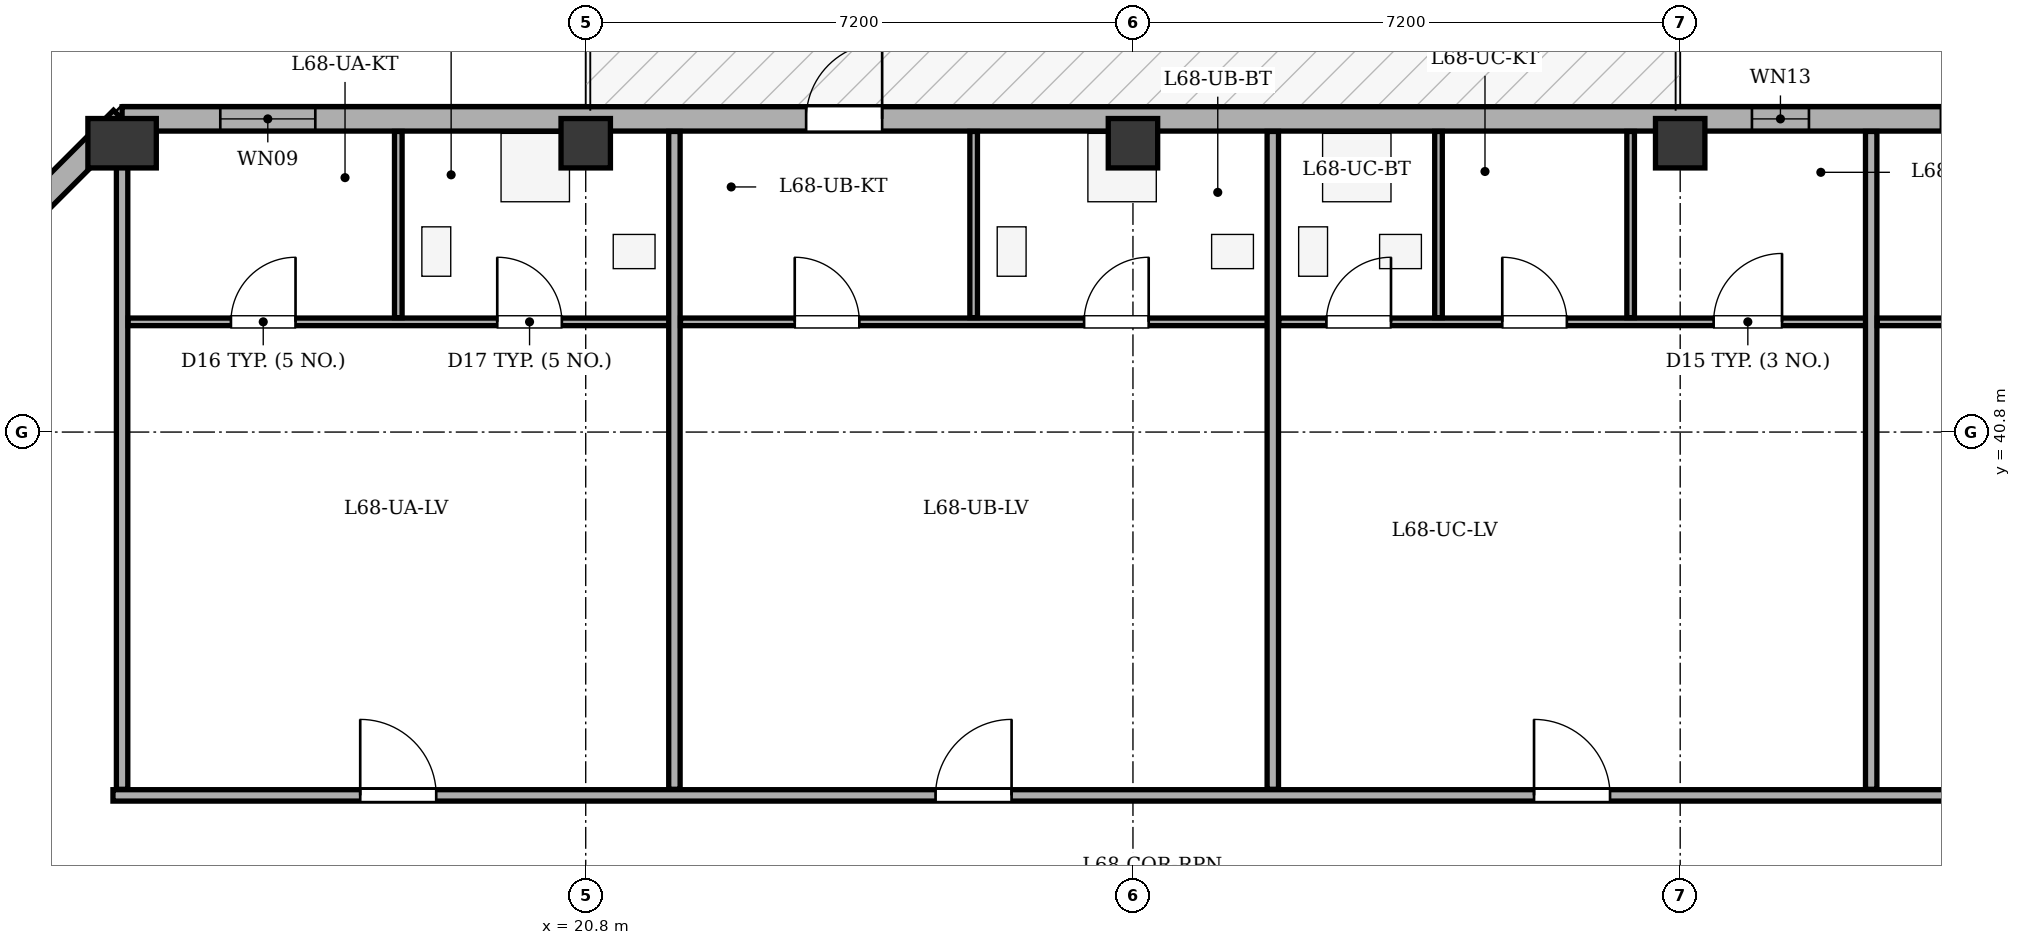
"""IFC4 building model, lengths in metres.
Left out: names, types, materials, properties, quantities, classifications, styles, units other than length and angle.
Written with IfcOpenShell. Run it as: python <this file> out.ifc"""

import sys

from ifc_helpers import new_model, si_unit, direction, frame, frame_2d, origin, origin_2d, place, context, subcontext, project, spatial, rectangle, extrude, element, fill, save


model = new_model("IFC4")
c1 = context("Model", 3, precision=1e-05, world=origin(), true_north=direction((0.0, 1.0)))
c2 = subcontext(c1, "Body", "Model", "MODEL_VIEW")
j1 = project(units=[si_unit("LENGTHUNIT", "METRE"), si_unit("PLANEANGLEUNIT", "RADIAN")], contexts=[c1])
p1 = place(None, origin())
s1 = spatial("IfcSite", under=j1, at=p1, CompositionType="ELEMENT")
p2 = place(p1, origin())
s2 = spatial("IfcBuilding", under=s1, at=p2, CompositionType="ELEMENT")
p3 = place(p2, frame((0.0, 0.0, 258.5)))
s3 = spatial("IfcBuildingStorey", under=s2, at=p3, CompositionType="ELEMENT", Elevation=258.5)
p4 = place(p3, frame((14.7, 44.6, 0.0), z_axis=(0.0, 0.0, 1.0), x_axis=(1.0, 0.0, 0.0)))
e1 = element("IfcColumn", 1, at=p4, inside=s3, PredefinedType="COLUMN", context=c2, shape_type="SweptSolid", body=[
    extrude(rectangle(XDim=0.65, YDim=0.9, at=origin_2d()), origin(), (0.0, 0.0, 1.0), 3.4),
])
for number, where, z_axis, x_axis in (
    (2, (20.8, 44.6, 0.0), (0.0, 0.0, 1.0), (1.0, 0.0, 0.0)),
    (3, (28.0, 44.6, 0.0), (0.0, 0.0, 1.0), (1.0, 0.0, 0.0)),
    (4, (35.2, 44.6, 0.0), (0.0, 0.0, 1.0), (1.0, 0.0, 0.0)),
):
    element("IfcColumn", number, at=place(p3, frame(where, z_axis=z_axis, x_axis=x_axis)), inside=s3, PredefinedType="COLUMN", context=c2, shape_type="SweptSolid", body=[
        extrude(rectangle(XDim=0.65, YDim=0.65, at=origin_2d()), origin(), (0.0, 0.0, 1.0), 3.4),
    ])
p5 = place(p3, frame((10.88, 41.1, 0.0), z_axis=(0.0, 0.0, 1.0), x_axis=(0.70712937715, 0.707084184501, 0.0)))
e5 = element("IfcWall", 5, at=p5, inside=s3, PredefinedType="STANDARD", context=c2, shape_type="SweptSolid", body=[
    extrude(rectangle(XDim=5.402, YDim=0.32, at=frame_2d((2.701, 0.0))), origin(), (0.0, 0.0, 1.0), 2.725),
])
p6 = place(p5, frame((2.001, 0.0, 0.75)))
e6 = element("IfcOpeningElement", 6, at=p6, cuts=e5, PredefinedType="OPENING", context=c2, shape_type="SweptSolid", body=[
    extrude(rectangle(XDim=1.4, YDim=1.65, at=frame_2d((0.7, 0.825))), frame((0.0, 0.17, 0.0), z_axis=(0.0, -1.0, 0.0), x_axis=(1.0, 0.0, 0.0)), (0.0, 0.0, 1.0), 0.34),
])
p7 = place(p3, frame((14.7, 44.92, 0.0), z_axis=(0.0, 0.0, 1.0), x_axis=(1.0, 0.0, 0.0)))
e7 = element("IfcWall", 7, at=p7, inside=s3, PredefinedType="STANDARD", context=c2, shape_type="SweptSolid", body=[
    extrude(rectangle(XDim=37.0, YDim=0.32, at=frame_2d((18.5, 0.0))), origin(), (0.0, 0.0, 1.0), 2.725),
])
p8 = place(p7, frame((9.0, 0.0, 0.0)))
e8 = element("IfcOpeningElement", 8, at=p8, cuts=e7, PredefinedType="OPENING", context=c2, shape_type="SweptSolid", body=[
    extrude(rectangle(XDim=1.0, YDim=2.02, at=frame_2d((0.5, 1.01))), frame((0.0, 0.17, 0.0), z_axis=(0.0, -1.0, 0.0), x_axis=(1.0, 0.0, 0.0)), (0.0, 0.0, 1.0), 0.34),
])
p9 = place(p7, frame((1.292, 0.0, 0.75)))
e9 = element("IfcOpeningElement", 9, at=p9, cuts=e7, PredefinedType="OPENING", context=c2, shape_type="SweptSolid", body=[
    extrude(rectangle(XDim=1.25, YDim=1.7, at=frame_2d((0.625, 0.85))), frame((0.0, 0.17, 0.0), z_axis=(0.0, -1.0, 0.0), x_axis=(1.0, 0.0, 0.0)), (0.0, 0.0, 1.0), 0.34),
])
p10 = place(p7, frame((23.93, 0.0, 0.75)))
e10 = element("IfcOpeningElement", 10, at=p10, cuts=e7, PredefinedType="OPENING", context=c2, shape_type="SweptSolid", body=[
    extrude(rectangle(XDim=1.8, YDim=1.7, at=frame_2d((0.9, 0.85))), frame((0.0, 0.17, 0.0), z_axis=(0.0, -1.0, 0.0), x_axis=(1.0, 0.0, 0.0)), (0.0, 0.0, 1.0), 0.34),
])
p11 = place(p7, frame((27.563, 0.0, 0.75)))
e11 = element("IfcOpeningElement", 11, at=p11, cuts=e7, PredefinedType="OPENING", context=c2, shape_type="SweptSolid", body=[
    extrude(rectangle(XDim=1.8, YDim=1.7, at=frame_2d((0.9, 0.85))), frame((0.0, 0.17, 0.0), z_axis=(0.0, -1.0, 0.0), x_axis=(1.0, 0.0, 0.0)), (0.0, 0.0, 1.0), 0.34),
])
p12 = place(p7, frame((31.315, 0.0, 0.75)))
e12 = element("IfcOpeningElement", 12, at=p12, cuts=e7, PredefinedType="OPENING", context=c2, shape_type="SweptSolid", body=[
    extrude(rectangle(XDim=1.8, YDim=1.7, at=frame_2d((0.9, 0.85))), frame((0.0, 0.17, 0.0), z_axis=(0.0, -1.0, 0.0), x_axis=(1.0, 0.0, 0.0)), (0.0, 0.0, 1.0), 0.34),
])
p13 = place(p7, frame((33.965, 0.0, 0.75)))
e13 = element("IfcOpeningElement", 13, at=p13, cuts=e7, PredefinedType="OPENING", context=c2, shape_type="SweptSolid", body=[
    extrude(rectangle(XDim=1.8, YDim=1.7, at=frame_2d((0.9, 0.85))), frame((0.0, 0.17, 0.0), z_axis=(0.0, -1.0, 0.0), x_axis=(1.0, 0.0, 0.0)), (0.0, 0.0, 1.0), 0.34),
])
p14 = place(p7, frame((21.444, 0.0, 0.75)))
e14 = element("IfcOpeningElement", 14, at=p14, cuts=e7, PredefinedType="OPENING", context=c2, shape_type="SweptSolid", body=[
    extrude(rectangle(XDim=0.75, YDim=1.45, at=frame_2d((0.375, 0.725))), frame((0.0, 0.17, 0.0), z_axis=(0.0, -1.0, 0.0), x_axis=(1.0, 0.0, 0.0)), (0.0, 0.0, 1.0), 0.34),
])
p15 = place(p3, frame((14.58, 36.02, 0.0), z_axis=(0.0, 0.0, 1.0), x_axis=(1.0, 0.0, 0.0)))
e15 = element("IfcWall", 15, at=p15, inside=s3, PredefinedType="PARTITIONING", context=c2, shape_type="SweptSolid", body=[
    extrude(rectangle(XDim=30.52, YDim=0.15, at=frame_2d((15.26, 0.0))), origin(), (0.0, 0.0, 1.0), 3.1),
])
p16 = place(p15, frame((3.253, 0.0, 0.0)))
e16 = element("IfcOpeningElement", 16, at=p16, cuts=e15, PredefinedType="OPENING", context=c2, shape_type="SweptSolid", body=[
    extrude(rectangle(XDim=1.0, YDim=2.1, at=frame_2d((0.5, 1.05))), frame((0.0, 0.085, 0.0), z_axis=(0.0, -1.0, 0.0), x_axis=(1.0, 0.0, 0.0)), (0.0, 0.0, 1.0), 0.17),
])
p17 = place(p15, frame((10.823, 0.0, 0.0)))
e17 = element("IfcOpeningElement", 17, at=p17, cuts=e15, PredefinedType="OPENING", context=c2, shape_type="SweptSolid", body=[
    extrude(rectangle(XDim=1.0, YDim=2.1, at=frame_2d((0.5, 1.05))), frame((0.0, 0.085, 0.0), z_axis=(0.0, -1.0, 0.0), x_axis=(1.0, 0.0, 0.0)), (0.0, 0.0, 1.0), 0.17),
])
p18 = place(p15, frame((18.697, 0.0, 0.0)))
e18 = element("IfcOpeningElement", 18, at=p18, cuts=e15, PredefinedType="OPENING", context=c2, shape_type="SweptSolid", body=[
    extrude(rectangle(XDim=1.0, YDim=2.1, at=frame_2d((0.5, 1.05))), frame((0.0, 0.085, 0.0), z_axis=(0.0, -1.0, 0.0), x_axis=(1.0, 0.0, 0.0)), (0.0, 0.0, 1.0), 0.17),
])
p19 = place(p15, frame((26.267, 0.0, 0.0)))
e19 = element("IfcOpeningElement", 19, at=p19, cuts=e15, PredefinedType="OPENING", context=c2, shape_type="SweptSolid", body=[
    extrude(rectangle(XDim=1.0, YDim=2.1, at=frame_2d((0.5, 1.05))), frame((0.0, 0.085, 0.0), z_axis=(0.0, -1.0, 0.0), x_axis=(1.0, 0.0, 0.0)), (0.0, 0.0, 1.0), 0.17),
])
p20 = place(p3, frame((14.7, 36.1, 0.0), z_axis=(0.0, 0.0, 1.0), x_axis=(0.0, 1.0, 0.0)))
e20 = element("IfcWall", 20, at=p20, inside=s3, PredefinedType="PARTITIONING", context=c2, shape_type="SweptSolid", body=[
    extrude(rectangle(XDim=8.655, YDim=0.15, at=frame_2d((4.327, 0.0))), origin(), (0.0, 0.0, 1.0), 3.1),
])
p21 = place(p3, frame((14.78, 42.25, 0.0), z_axis=(0.0, 0.0, 1.0), x_axis=(1.0, 0.0, 0.0)))
e21 = element("IfcWall", 21, at=p21, inside=s3, PredefinedType="PARTITIONING", context=c2, shape_type="SweptSolid", body=[
    extrude(rectangle(XDim=7.227, YDim=0.1, at=frame_2d((3.614, 0.0))), origin(), (0.0, 0.0, 1.0), 3.1),
])
p22 = place(p21, frame((1.352, 0.0, 0.0)))
e22 = element("IfcOpeningElement", 22, at=p22, cuts=e21, PredefinedType="OPENING", context=c2, shape_type="SweptSolid", body=[
    extrude(rectangle(XDim=0.85, YDim=2.05, at=frame_2d((0.425, 1.025))), frame((0.0, 0.06, 0.0), z_axis=(0.0, -1.0, 0.0), x_axis=(1.0, 0.0, 0.0)), (0.0, 0.0, 1.0), 0.12),
])
p23 = place(p21, frame((4.856, 0.0, 0.0)))
e23 = element("IfcOpeningElement", 23, at=p23, cuts=e21, PredefinedType="OPENING", context=c2, shape_type="SweptSolid", body=[
    extrude(rectangle(XDim=0.85, YDim=2.05, at=frame_2d((0.425, 1.025))), frame((0.0, 0.06, 0.0), z_axis=(0.0, -1.0, 0.0), x_axis=(1.0, 0.0, 0.0)), (0.0, 0.0, 1.0), 0.12),
])
p24 = place(p3, frame((18.334, 42.305, 0.0), z_axis=(0.0, 0.0, 1.0), x_axis=(0.0, 1.0, 0.0)))
e24 = element("IfcWall", 24, at=p24, inside=s3, PredefinedType="PARTITIONING", context=c2, shape_type="SweptSolid", body=[
    extrude(rectangle(XDim=2.45, YDim=0.1, at=frame_2d((1.225, 0.0))), origin(), (0.0, 0.0, 1.0), 3.1),
])
p25 = place(p3, frame((21.967, 36.1, 0.0), z_axis=(0.0, 0.0, 1.0), x_axis=(0.0, 1.0, 0.0)))
e25 = element("IfcWall", 25, at=p25, inside=s3, PredefinedType="PARTITIONING", context=c2, shape_type="SweptSolid", body=[
    extrude(rectangle(XDim=8.655, YDim=0.15, at=frame_2d((4.327, 0.0))), origin(), (0.0, 0.0, 1.0), 3.1),
])
p26 = place(p3, frame((22.047, 42.25, 0.0), z_axis=(0.0, 0.0, 1.0), x_axis=(1.0, 0.0, 0.0)))
e26 = element("IfcWall", 26, at=p26, inside=s3, PredefinedType="PARTITIONING", context=c2, shape_type="SweptSolid", body=[
    extrude(rectangle(XDim=7.833, YDim=0.1, at=frame_2d((3.917, 0.0))), origin(), (0.0, 0.0, 1.0), 3.1),
])
p27 = place(p26, frame((1.503, 0.0, 0.0)))
e27 = element("IfcOpeningElement", 27, at=p27, cuts=e26, PredefinedType="OPENING", context=c2, shape_type="SweptSolid", body=[
    extrude(rectangle(XDim=0.85, YDim=2.05, at=frame_2d((0.425, 1.025))), frame((0.0, 0.06, 0.0), z_axis=(0.0, -1.0, 0.0), x_axis=(1.0, 0.0, 0.0)), (0.0, 0.0, 1.0), 0.12),
])
p28 = place(p26, frame((5.31, 0.0, 0.0)))
e28 = element("IfcOpeningElement", 28, at=p28, cuts=e26, PredefinedType="OPENING", context=c2, shape_type="SweptSolid", body=[
    extrude(rectangle(XDim=0.85, YDim=2.05, at=frame_2d((0.425, 1.025))), frame((0.0, 0.06, 0.0), z_axis=(0.0, -1.0, 0.0), x_axis=(1.0, 0.0, 0.0)), (0.0, 0.0, 1.0), 0.12),
])
p29 = place(p3, frame((25.904, 42.305, 0.0), z_axis=(0.0, 0.0, 1.0), x_axis=(0.0, 1.0, 0.0)))
e29 = element("IfcWall", 29, at=p29, inside=s3, PredefinedType="PARTITIONING", context=c2, shape_type="SweptSolid", body=[
    extrude(rectangle(XDim=2.45, YDim=0.1, at=frame_2d((1.225, 0.0))), origin(), (0.0, 0.0, 1.0), 3.1),
])
p30 = place(p3, frame((29.84, 36.1, 0.0), z_axis=(0.0, 0.0, 1.0), x_axis=(0.0, 1.0, 0.0)))
e30 = element("IfcWall", 30, at=p30, inside=s3, PredefinedType="PARTITIONING", context=c2, shape_type="SweptSolid", body=[
    extrude(rectangle(XDim=8.655, YDim=0.15, at=frame_2d((4.327, 0.0))), origin(), (0.0, 0.0, 1.0), 2.725),
])
p31 = place(p3, frame((29.92, 42.25, 0.0), z_axis=(0.0, 0.0, 1.0), x_axis=(1.0, 0.0, 0.0)))
e31 = element("IfcWall", 31, at=p31, inside=s3, PredefinedType="PARTITIONING", context=c2, shape_type="SweptSolid", body=[
    extrude(rectangle(XDim=7.833, YDim=0.1, at=frame_2d((3.917, 0.0))), origin(), (0.0, 0.0, 1.0), 3.1),
])
p32 = place(p31, frame((0.625, 0.0, 0.0)))
e32 = element("IfcOpeningElement", 32, at=p32, cuts=e31, PredefinedType="OPENING", context=c2, shape_type="SweptSolid", body=[
    extrude(rectangle(XDim=0.85, YDim=2.05, at=frame_2d((0.425, 1.025))), frame((0.0, 0.06, 0.0), z_axis=(0.0, -1.0, 0.0), x_axis=(1.0, 0.0, 0.0)), (0.0, 0.0, 1.0), 0.12),
])
p33 = place(p31, frame((2.939, 0.0, 0.0)))
e33 = element("IfcOpeningElement", 33, at=p33, cuts=e31, PredefinedType="OPENING", context=c2, shape_type="SweptSolid", body=[
    extrude(rectangle(XDim=0.85, YDim=2.05, at=frame_2d((0.425, 1.025))), frame((0.0, 0.06, 0.0), z_axis=(0.0, -1.0, 0.0), x_axis=(1.0, 0.0, 0.0)), (0.0, 0.0, 1.0), 0.12),
])
p34 = place(p31, frame((5.72, 0.0, 0.0)))
e34 = element("IfcOpeningElement", 34, at=p34, cuts=e31, PredefinedType="OPENING", context=c2, shape_type="SweptSolid", body=[
    extrude(rectangle(XDim=0.9, YDim=2.05, at=frame_2d((0.45, 1.025))), frame((0.0, 0.06, 0.0), z_axis=(0.0, -1.0, 0.0), x_axis=(1.0, 0.0, 0.0)), (0.0, 0.0, 1.0), 0.12),
])
for number, where, z_axis, x_axis in (
    (35, (32.02, 42.305, 0.0), (0.0, 0.0, 1.0), (0.0, 1.0, 0.0)),
    (36, (34.548, 42.305, 0.0), (0.0, 0.0, 1.0), (0.0, 1.0, 0.0)),
):
    element("IfcWall", number, at=place(p3, frame(where, z_axis=z_axis, x_axis=x_axis)), inside=s3, PredefinedType="PARTITIONING", context=c2, shape_type="SweptSolid", body=[
        extrude(rectangle(XDim=2.45, YDim=0.1, at=frame_2d((1.225, 0.0))), origin(), (0.0, 0.0, 1.0), 3.1),
    ])
p35 = place(p3, frame((37.713, 36.1, 0.0), z_axis=(0.0, 0.0, 1.0), x_axis=(0.0, 1.0, 0.0)))
e37 = element("IfcWall", 37, at=p35, inside=s3, PredefinedType="PARTITIONING", context=c2, shape_type="SweptSolid", body=[
    extrude(rectangle(XDim=8.655, YDim=0.15, at=frame_2d((4.327, 0.0))), origin(), (0.0, 0.0, 1.0), 3.1),
])
p36 = place(p3, frame((37.793, 42.25, 0.0), z_axis=(0.0, 0.0, 1.0), x_axis=(1.0, 0.0, 0.0)))
e38 = element("IfcWall", 38, at=p36, inside=s3, PredefinedType="PARTITIONING", context=c2, shape_type="SweptSolid", body=[
    extrude(rectangle(XDim=7.227, YDim=0.1, at=frame_2d((3.614, 0.0))), origin(), (0.0, 0.0, 1.0), 3.1),
])
p37 = place(p36, frame((1.352, 0.0, 0.0)))
e39 = element("IfcOpeningElement", 39, at=p37, cuts=e38, PredefinedType="OPENING", context=c2, shape_type="SweptSolid", body=[
    extrude(rectangle(XDim=0.85, YDim=2.05, at=frame_2d((0.425, 1.025))), frame((0.0, 0.06, 0.0), z_axis=(0.0, -1.0, 0.0), x_axis=(1.0, 0.0, 0.0)), (0.0, 0.0, 1.0), 0.12),
])
p38 = place(p36, frame((4.855, 0.0, 0.0)))
e40 = element("IfcOpeningElement", 40, at=p38, cuts=e38, PredefinedType="OPENING", context=c2, shape_type="SweptSolid", body=[
    extrude(rectangle(XDim=0.85, YDim=2.05, at=frame_2d((0.425, 1.025))), frame((0.0, 0.06, 0.0), z_axis=(0.0, -1.0, 0.0), x_axis=(1.0, 0.0, 0.0)), (0.0, 0.0, 1.0), 0.12),
])
p39 = place(p8, origin())
e41 = element("IfcDoor", 41, at=p39, inside=s3, OperationType="SINGLE_SWING_RIGHT", PredefinedType="DOOR", context=c2, shape_type="SweptSolid", body=[
    extrude(rectangle(XDim=1.0, YDim=2.02, at=frame_2d((0.5, 1.01))), frame((0.0, 0.025, 0.0), z_axis=(0.0, -1.0, 0.0), x_axis=(1.0, 0.0, 0.0)), (0.0, 0.0, 1.0), 0.05),
])
fill(e8, e41)
p40 = place(p9, origin())
e42 = element("IfcWindow", 42, at=p40, inside=s3, PartitioningType="SINGLE_PANEL", PredefinedType="WINDOW", context=c2, shape_type="SweptSolid", body=[
    extrude(rectangle(XDim=1.25, YDim=1.7, at=frame_2d((0.625, 0.85))), frame((0.0, -0.01, 0.0), z_axis=(0.0, -1.0, 0.0), x_axis=(1.0, 0.0, 0.0)), (0.0, 0.0, 1.0), 0.06),
])
fill(e9, e42)
p41 = place(p10, origin())
e43 = element("IfcWindow", 43, at=p41, inside=s3, PartitioningType="SINGLE_PANEL", PredefinedType="WINDOW", context=c2, shape_type="SweptSolid", body=[
    extrude(rectangle(XDim=1.8, YDim=1.7, at=frame_2d((0.9, 0.85))), frame((0.0, -0.01, 0.0), z_axis=(0.0, -1.0, 0.0), x_axis=(1.0, 0.0, 0.0)), (0.0, 0.0, 1.0), 0.06),
])
fill(e10, e43)
p42 = place(p14, origin())
e44 = element("IfcWindow", 44, at=p42, inside=s3, PartitioningType="SINGLE_PANEL", PredefinedType="WINDOW", context=c2, shape_type="SweptSolid", body=[
    extrude(rectangle(XDim=0.75, YDim=1.45, at=frame_2d((0.375, 0.725))), frame((0.0, -0.01, 0.0), z_axis=(0.0, -1.0, 0.0), x_axis=(1.0, 0.0, 0.0)), (0.0, 0.0, 1.0), 0.06),
])
fill(e14, e44)
p43 = place(p16, origin())
e45 = element("IfcDoor", 45, at=p43, inside=s3, OperationType="SINGLE_SWING_LEFT", PredefinedType="DOOR", context=c2, shape_type="SweptSolid", body=[
    extrude(rectangle(XDim=1.0, YDim=2.1, at=frame_2d((0.5, 1.05))), frame((0.0, 0.025, 0.0), z_axis=(0.0, -1.0, 0.0), x_axis=(1.0, 0.0, 0.0)), (0.0, 0.0, 1.0), 0.05),
])
fill(e16, e45)
p44 = place(p17, origin())
e46 = element("IfcDoor", 46, at=p44, inside=s3, OperationType="SINGLE_SWING_RIGHT", PredefinedType="DOOR", context=c2, shape_type="SweptSolid", body=[
    extrude(rectangle(XDim=1.0, YDim=2.1, at=frame_2d((0.5, 1.05))), frame((0.0, 0.025, 0.0), z_axis=(0.0, -1.0, 0.0), x_axis=(1.0, 0.0, 0.0)), (0.0, 0.0, 1.0), 0.05),
])
fill(e17, e46)
p45 = place(p18, origin())
e47 = element("IfcDoor", 47, at=p45, inside=s3, OperationType="SINGLE_SWING_LEFT", PredefinedType="DOOR", context=c2, shape_type="SweptSolid", body=[
    extrude(rectangle(XDim=1.0, YDim=2.1, at=frame_2d((0.5, 1.05))), frame((0.0, 0.025, 0.0), z_axis=(0.0, -1.0, 0.0), x_axis=(1.0, 0.0, 0.0)), (0.0, 0.0, 1.0), 0.05),
])
fill(e18, e47)
p46 = place(p22, origin())
e48 = element("IfcDoor", 48, at=p46, inside=s3, OperationType="SINGLE_SWING_RIGHT", PredefinedType="DOOR", context=c2, shape_type="SweptSolid", body=[
    extrude(rectangle(XDim=0.85, YDim=2.05, at=frame_2d((0.425, 1.025))), frame((0.0, 0.025, 0.0), z_axis=(0.0, -1.0, 0.0), x_axis=(1.0, 0.0, 0.0)), (0.0, 0.0, 1.0), 0.05),
])
fill(e22, e48)
p47 = place(p23, origin())
e49 = element("IfcDoor", 49, at=p47, inside=s3, OperationType="SINGLE_SWING_LEFT", PredefinedType="DOOR", context=c2, shape_type="SweptSolid", body=[
    extrude(rectangle(XDim=0.85, YDim=2.05, at=frame_2d((0.425, 1.025))), frame((0.0, 0.025, 0.0), z_axis=(0.0, -1.0, 0.0), x_axis=(1.0, 0.0, 0.0)), (0.0, 0.0, 1.0), 0.05),
])
fill(e23, e49)
p48 = place(p27, origin())
e50 = element("IfcDoor", 50, at=p48, inside=s3, OperationType="SINGLE_SWING_LEFT", PredefinedType="DOOR", context=c2, shape_type="SweptSolid", body=[
    extrude(rectangle(XDim=0.85, YDim=2.05, at=frame_2d((0.425, 1.025))), frame((0.0, 0.025, 0.0), z_axis=(0.0, -1.0, 0.0), x_axis=(1.0, 0.0, 0.0)), (0.0, 0.0, 1.0), 0.05),
])
fill(e27, e50)
p49 = place(p28, origin())
e51 = element("IfcDoor", 51, at=p49, inside=s3, OperationType="SINGLE_SWING_RIGHT", PredefinedType="DOOR", context=c2, shape_type="SweptSolid", body=[
    extrude(rectangle(XDim=0.85, YDim=2.05, at=frame_2d((0.425, 1.025))), frame((0.0, 0.025, 0.0), z_axis=(0.0, -1.0, 0.0), x_axis=(1.0, 0.0, 0.0)), (0.0, 0.0, 1.0), 0.05),
])
fill(e28, e51)
p50 = place(p32, origin())
e52 = element("IfcDoor", 52, at=p50, inside=s3, OperationType="SINGLE_SWING_RIGHT", PredefinedType="DOOR", context=c2, shape_type="SweptSolid", body=[
    extrude(rectangle(XDim=0.85, YDim=2.05, at=frame_2d((0.425, 1.025))), frame((0.0, 0.025, 0.0), z_axis=(0.0, -1.0, 0.0), x_axis=(1.0, 0.0, 0.0)), (0.0, 0.0, 1.0), 0.05),
])
fill(e32, e52)
p51 = place(p33, origin())
e53 = element("IfcDoor", 53, at=p51, inside=s3, OperationType="SINGLE_SWING_LEFT", PredefinedType="DOOR", context=c2, shape_type="SweptSolid", body=[
    extrude(rectangle(XDim=0.85, YDim=2.05, at=frame_2d((0.425, 1.025))), frame((0.0, 0.025, 0.0), z_axis=(0.0, -1.0, 0.0), x_axis=(1.0, 0.0, 0.0)), (0.0, 0.0, 1.0), 0.05),
])
fill(e33, e53)
p52 = place(p34, origin())
e54 = element("IfcDoor", 54, at=p52, inside=s3, OperationType="SINGLE_SWING_RIGHT", PredefinedType="DOOR", context=c2, shape_type="SweptSolid", body=[
    extrude(rectangle(XDim=0.9, YDim=2.05, at=frame_2d((0.45, 1.025))), frame((0.0, 0.025, 0.0), z_axis=(0.0, -1.0, 0.0), x_axis=(1.0, 0.0, 0.0)), (0.0, 0.0, 1.0), 0.05),
])
fill(e34, e54)
save(model, sys.argv[1])
